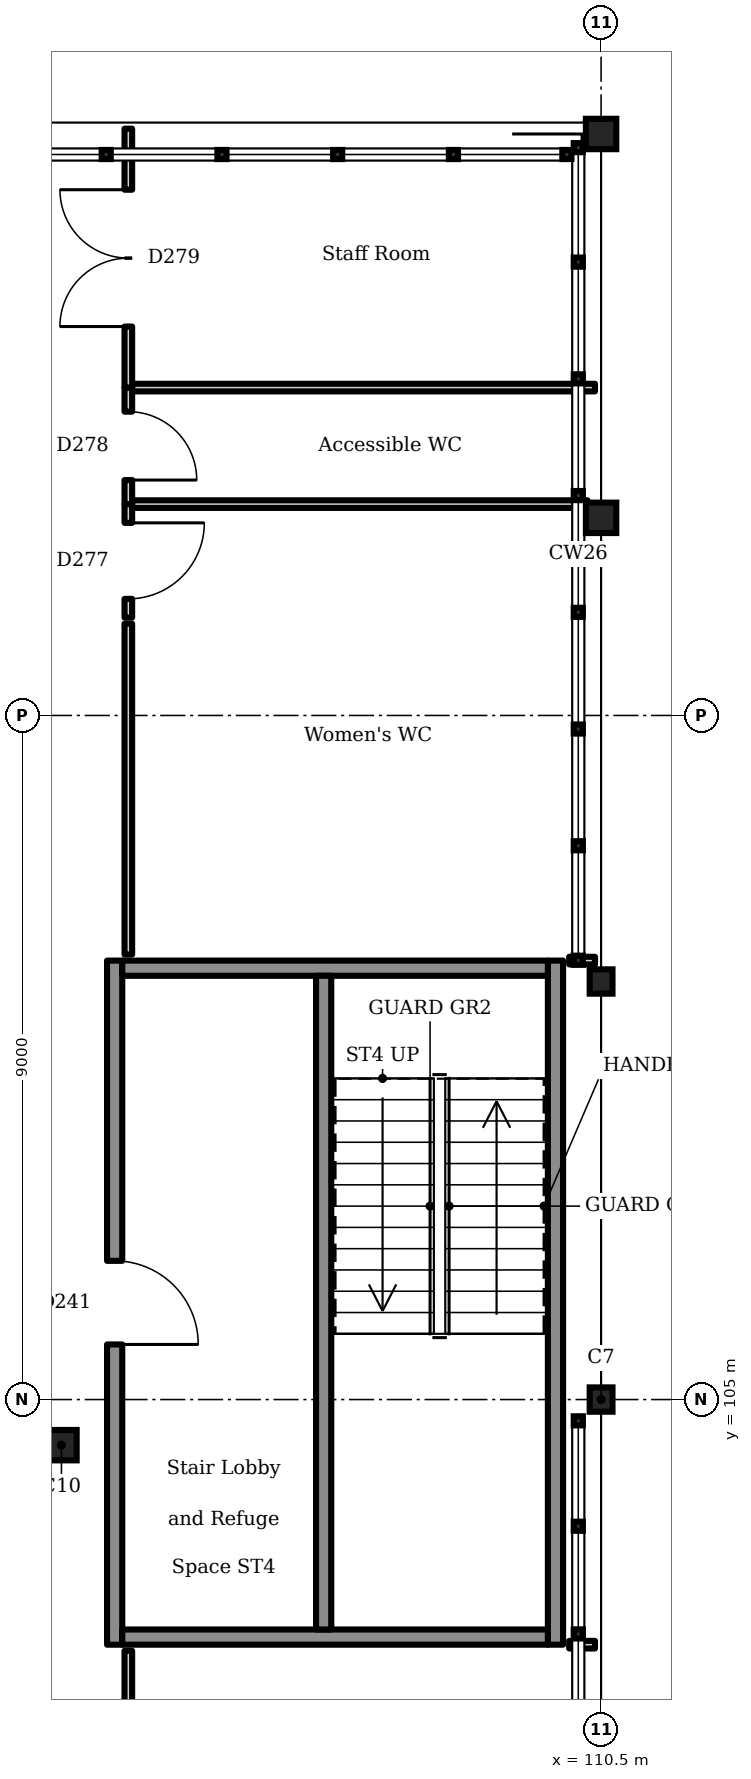
"""IFC4 building model, lengths in metres.
Left out: names, types, materials, properties, quantities, classifications, styles, units other than length and angle.
Written with IfcOpenShell. Run it as: python <this file> out.ifc"""

import sys

from ifc_helpers import new_model, si_unit, direction, frame, frame_2d, origin, origin_2d, place, context, subcontext, project, spatial, rectangle, hollow_circle, i_section, extrude, element, fill, save


model = new_model("IFC4")
c1 = context("Model", 3, precision=1e-05, world=origin(), true_north=direction((0.0, 1.0)))
c2 = subcontext(c1, "Body", "Model", "MODEL_VIEW")
j1 = project(units=[si_unit("LENGTHUNIT", "METRE"), si_unit("PLANEANGLEUNIT", "RADIAN")], contexts=[c1])
p1 = place(None, origin())
s1 = spatial("IfcSite", under=j1, at=p1, CompositionType="ELEMENT")
p2 = place(p1, origin())
s2 = spatial("IfcBuilding", under=s1, at=p2, CompositionType="ELEMENT")
p3 = place(p2, frame((0.0, 0.0, 14.4)))
s3 = spatial("IfcBuildingStorey", under=s2, at=p3, CompositionType="ELEMENT", Elevation=14.4)
for number, where, z_axis, x_axis in (
    (1, (110.5, 105.0, 0.0), (0.0, 0.0, 1.0), (1.0, 0.0, 0.0)),
    (2, (110.5, 110.5, 0.0), (0.0, 0.0, 1.0), (1.0, 0.0, 0.0)),
):
    element("IfcColumn", number, at=place(p3, frame(where, z_axis=z_axis, x_axis=x_axis)), inside=s3, PredefinedType="COLUMN", context=c2, shape_type="SweptSolid", body=[
        extrude(i_section(OverallWidth=0.3, OverallDepth=0.32, WebThickness=0.011, FlangeThickness=0.021, FilletRadius=0.027, at=origin_2d()), origin(), (0.0, 0.0, 1.0), 4.5),
    ])
p4 = place(p3, frame((103.4, 104.4, 0.0), z_axis=(0.0, 0.0, 1.0), x_axis=(1.0, 0.0, 0.0)))
e3 = element("IfcColumn", 3, at=p4, inside=s3, PredefinedType="COLUMN", context=c2, shape_type="SweptSolid", body=[
    extrude(hollow_circle(Radius=0.203, WallThickness=0.016, at=origin_2d()), origin(), (0.0, 0.0, 1.0), 4.5),
])
for number, where, z_axis, x_axis in (
    (4, (110.5, 121.65, 0.0), (0.0, 0.0, 1.0), (1.0, 0.0, 0.0)),
    (5, (110.5, 116.6, 0.0), (0.0, 0.0, 1.0), (1.0, 0.0, 0.0)),
):
    element("IfcColumn", number, at=place(p3, frame(where, z_axis=z_axis, x_axis=x_axis)), inside=s3, PredefinedType="COLUMN", context=c2, shape_type="SweptSolid", body=[
        extrude(hollow_circle(Radius=0.178, WallThickness=0.008, at=origin_2d()), origin(), (0.0, 0.0, 1.0), 4.5),
    ])
p5 = place(p3, frame((104.1, 101.775, 0.0), z_axis=(0.0, 0.0, 1.0), x_axis=(0.0, 1.0, 0.0)))
e6 = element("IfcWall", 6, at=p5, inside=s3, PredefinedType="SOLIDWALL", context=c2, shape_type="SweptSolid", body=[
    extrude(rectangle(XDim=9.0, YDim=0.2, at=frame_2d((4.5, 0.0))), origin(), (0.0, 0.0, 1.0), 4.35),
])
p6 = place(p5, frame((3.95, 0.0, 0.0)))
e7 = element("IfcOpeningElement", 7, at=p6, cuts=e6, PredefinedType="OPENING", context=c2, shape_type="SweptSolid", body=[
    extrude(rectangle(XDim=1.1, YDim=2.1, at=frame_2d((0.55, 1.05))), frame((0.0, 0.11, 0.0), z_axis=(0.0, -1.0, 0.0), x_axis=(1.0, 0.0, 0.0)), (0.0, 0.0, 1.0), 0.22),
])
p7 = place(p3, frame((109.9, 101.775, 0.0), z_axis=(0.0, 0.0, 1.0), x_axis=(0.0, 1.0, 0.0)))
e8 = element("IfcWall", 8, at=p7, inside=s3, PredefinedType="SOLIDWALL", context=c2, shape_type="SweptSolid", body=[
    extrude(rectangle(XDim=9.0, YDim=0.2, at=frame_2d((4.5, 0.0))), origin(), (0.0, 0.0, 1.0), 4.35),
])
for number, where, z_axis, x_axis in (
    (9, (104.2, 101.875, 0.0), (0.0, 0.0, 1.0), (1.0, 0.0, 0.0)),
    (10, (104.2, 110.675, 0.0), (0.0, 0.0, 1.0), (1.0, 0.0, 0.0)),
):
    element("IfcWall", number, at=place(p3, frame(where, z_axis=z_axis, x_axis=x_axis)), inside=s3, PredefinedType="SOLIDWALL", context=c2, shape_type="SweptSolid", body=[
        extrude(rectangle(XDim=5.6, YDim=0.2, at=frame_2d((2.8, 0.0))), origin(), (0.0, 0.0, 1.0), 4.35),
    ])
p8 = place(p3, frame((106.85, 101.975, 0.0), z_axis=(0.0, 0.0, 1.0), x_axis=(0.0, 1.0, 0.0)))
e11 = element("IfcWall", 11, at=p8, inside=s3, PredefinedType="SOLIDWALL", context=c2, shape_type="SweptSolid", body=[
    extrude(rectangle(XDim=8.6, YDim=0.2, at=frame_2d((4.3, 0.0))), origin(), (0.0, 0.0, 1.0), 4.35),
])
p9 = place(p3, frame((104.28, 96.08, 0.0), z_axis=(0.0, 0.0, 1.0), x_axis=(0.0, 1.0, 0.0)))
e12 = element("IfcWall", 12, at=p9, inside=s3, PredefinedType="PARTITIONING", context=c2, shape_type="SweptSolid", body=[
    extrude(rectangle(XDim=5.615, YDim=0.1, at=frame_2d((2.808, 0.0))), origin(), (0.0, 0.0, 1.0), 4.35),
])
p10 = place(p9, frame((1.907, 0.0, 0.0)))
e13 = element("IfcOpeningElement", 13, at=p10, cuts=e12, PredefinedType="OPENING", context=c2, shape_type="SweptSolid", body=[
    extrude(rectangle(XDim=1.8, YDim=2.1, at=frame_2d((0.9, 1.05))), frame((0.0, 0.06, 0.0), z_axis=(0.0, -1.0, 0.0), x_axis=(1.0, 0.0, 0.0)), (0.0, 0.0, 1.0), 0.12),
])
p11 = place(p3, frame((110.08, 101.775, 0.0), z_axis=(0.0, 0.0, 1.0), x_axis=(1.0, 0.0, 0.0)))
e14 = element("IfcWall", 14, at=p11, inside=s3, PredefinedType="PARTITIONING", context=c2, shape_type="SweptSolid", body=[
    extrude(rectangle(XDim=0.34, YDim=0.1, at=frame_2d((0.17, 0.0))), origin(), (0.0, 0.0, 1.0), 3.91),
])
p12 = place(p3, frame((110.42, 110.775, 0.0), z_axis=(0.0, 0.0, 1.0), x_axis=(-1.0, 0.0, 0.0)))
e15 = element("IfcWall", 15, at=p12, inside=s3, PredefinedType="PARTITIONING", context=c2, shape_type="SweptSolid", body=[
    extrude(rectangle(XDim=0.34, YDim=0.1, at=frame_2d((0.17, 0.0))), origin(), (0.0, 0.0, 1.0), 4.04),
])
p13 = place(p3, frame((104.28, 110.855, 0.0), z_axis=(0.0, 0.0, 1.0), x_axis=(0.0, 1.0, 0.0)))
e16 = element("IfcWall", 16, at=p13, inside=s3, PredefinedType="PARTITIONING", context=c2, shape_type="SweptSolid", body=[
    extrude(rectangle(XDim=4.352, YDim=0.1, at=frame_2d((2.176, 0.0))), origin(), (0.0, 0.0, 1.0), 4.35),
])
p14 = place(p3, frame((104.28, 115.287, 0.0), z_axis=(0.0, 0.0, 1.0), x_axis=(0.0, 1.0, 0.0)))
e17 = element("IfcWall", 17, at=p14, inside=s3, PredefinedType="PARTITIONING", context=c2, shape_type="SweptSolid", body=[
    extrude(rectangle(XDim=1.493, YDim=0.1, at=frame_2d((0.747, 0.0))), origin(), (0.0, 0.0, 1.0), 4.35),
])
p15 = place(p14, frame((0.247, 0.0, 0.0)))
e18 = element("IfcOpeningElement", 18, at=p15, cuts=e17, PredefinedType="OPENING", context=c2, shape_type="SweptSolid", body=[
    extrude(rectangle(XDim=1.0, YDim=2.1, at=frame_2d((0.5, 1.05))), frame((0.0, 0.06, 0.0), z_axis=(0.0, -1.0, 0.0), x_axis=(1.0, 0.0, 0.0)), (0.0, 0.0, 1.0), 0.12),
])
p16 = place(p3, frame((104.33, 116.781, 0.0), z_axis=(0.0, 0.0, 1.0), x_axis=(1.0, 0.0, 0.0)))
e19 = element("IfcWall", 19, at=p16, inside=s3, PredefinedType="PARTITIONING", context=c2, shape_type="SweptSolid", body=[
    extrude(rectangle(XDim=5.992, YDim=0.1, at=frame_2d((2.996, 0.0))), origin(), (0.0, 0.0, 1.0), 3.85),
])
p17 = place(p3, frame((104.28, 116.781, 0.0), z_axis=(0.0, 0.0, 1.0), x_axis=(0.0, 1.0, 0.0)))
e20 = element("IfcWall", 20, at=p17, inside=s3, PredefinedType="PARTITIONING", context=c2, shape_type="SweptSolid", body=[
    extrude(rectangle(XDim=1.533, YDim=0.1, at=frame_2d((0.767, 0.0))), origin(), (0.0, 0.0, 1.0), 4.35),
])
p18 = place(p17, frame((0.317, 0.0, 0.0)))
e21 = element("IfcOpeningElement", 21, at=p18, cuts=e20, PredefinedType="OPENING", context=c2, shape_type="SweptSolid", body=[
    extrude(rectangle(XDim=0.9, YDim=2.1, at=frame_2d((0.45, 1.05))), frame((0.0, 0.06, 0.0), z_axis=(0.0, -1.0, 0.0), x_axis=(1.0, 0.0, 0.0)), (0.0, 0.0, 1.0), 0.12),
])
p19 = place(p3, frame((104.33, 118.314, 0.0), z_axis=(0.0, 0.0, 1.0), x_axis=(1.0, 0.0, 0.0)))
e22 = element("IfcWall", 22, at=p19, inside=s3, PredefinedType="PARTITIONING", context=c2, shape_type="SweptSolid", body=[
    extrude(rectangle(XDim=6.09, YDim=0.1, at=frame_2d((3.045, 0.0))), origin(), (0.0, 0.0, 1.0), 3.85),
])
p20 = place(p3, frame((104.28, 118.314, 0.0), z_axis=(0.0, 0.0, 1.0), x_axis=(0.0, 1.0, 0.0)))
e23 = element("IfcWall", 23, at=p20, inside=s3, PredefinedType="PARTITIONING", context=c2, shape_type="SweptSolid", body=[
    extrude(rectangle(XDim=3.406, YDim=0.1, at=frame_2d((1.703, 0.0))), origin(), (0.0, 0.0, 1.0), 3.95),
])
p21 = place(p20, frame((0.803, 0.0, 0.0)))
e24 = element("IfcOpeningElement", 24, at=p21, cuts=e23, PredefinedType="OPENING", context=c2, shape_type="SweptSolid", body=[
    extrude(rectangle(XDim=1.8, YDim=2.1, at=frame_2d((0.9, 1.05))), frame((0.0, 0.06, 0.0), z_axis=(0.0, -1.0, 0.0), x_axis=(1.0, 0.0, 0.0)), (0.0, 0.0, 1.0), 0.12),
])
p22 = place(p6, frame((1.1, 0.0, 0.0), z_axis=(0.0, 0.0, 1.0), x_axis=(-1.0, 0.0, 0.0)))
e25 = element("IfcDoor", 25, at=p22, inside=s3, OperationType="SINGLE_SWING_LEFT", PredefinedType="DOOR", context=c2, shape_type="SweptSolid", body=[
    extrude(rectangle(XDim=1.1, YDim=2.1, at=frame_2d((0.55, 1.05))), frame((0.0, 0.025, 0.0), z_axis=(0.0, -1.0, 0.0), x_axis=(1.0, 0.0, 0.0)), (0.0, 0.0, 1.0), 0.05),
])
fill(e7, e25)
p23 = place(p15, frame((1.0, 0.0, 0.0), z_axis=(0.0, 0.0, 1.0), x_axis=(-1.0, 0.0, 0.0)))
e26 = element("IfcDoor", 26, at=p23, inside=s3, OperationType="SINGLE_SWING_RIGHT", PredefinedType="DOOR", context=c2, shape_type="SweptSolid", body=[
    extrude(rectangle(XDim=1.0, YDim=2.1, at=frame_2d((0.5, 1.05))), frame((0.0, 0.025, 0.0), z_axis=(0.0, -1.0, 0.0), x_axis=(1.0, 0.0, 0.0)), (0.0, 0.0, 1.0), 0.05),
])
fill(e18, e26)
p24 = place(p18, frame((0.9, 0.0, 0.0), z_axis=(0.0, 0.0, 1.0), x_axis=(-1.0, 0.0, 0.0)))
e27 = element("IfcDoor", 27, at=p24, inside=s3, OperationType="SINGLE_SWING_LEFT", PredefinedType="DOOR", context=c2, shape_type="SweptSolid", body=[
    extrude(rectangle(XDim=0.9, YDim=2.1, at=frame_2d((0.45, 1.05))), frame((0.0, 0.025, 0.0), z_axis=(0.0, -1.0, 0.0), x_axis=(1.0, 0.0, 0.0)), (0.0, 0.0, 1.0), 0.05),
])
fill(e21, e27)
p25 = place(p21, origin())
e28 = element("IfcDoor", 28, at=p25, inside=s3, OperationType="DOUBLE_DOOR_SINGLE_SWING", PredefinedType="DOOR", context=c2, shape_type="SweptSolid", body=[
    extrude(rectangle(XDim=1.8, YDim=2.1, at=frame_2d((0.9, 1.05))), frame((0.0, 0.025, 0.0), z_axis=(0.0, -1.0, 0.0), x_axis=(1.0, 0.0, 0.0)), (0.0, 0.0, 1.0), 0.05),
])
fill(e24, e28)
save(model, sys.argv[1])
